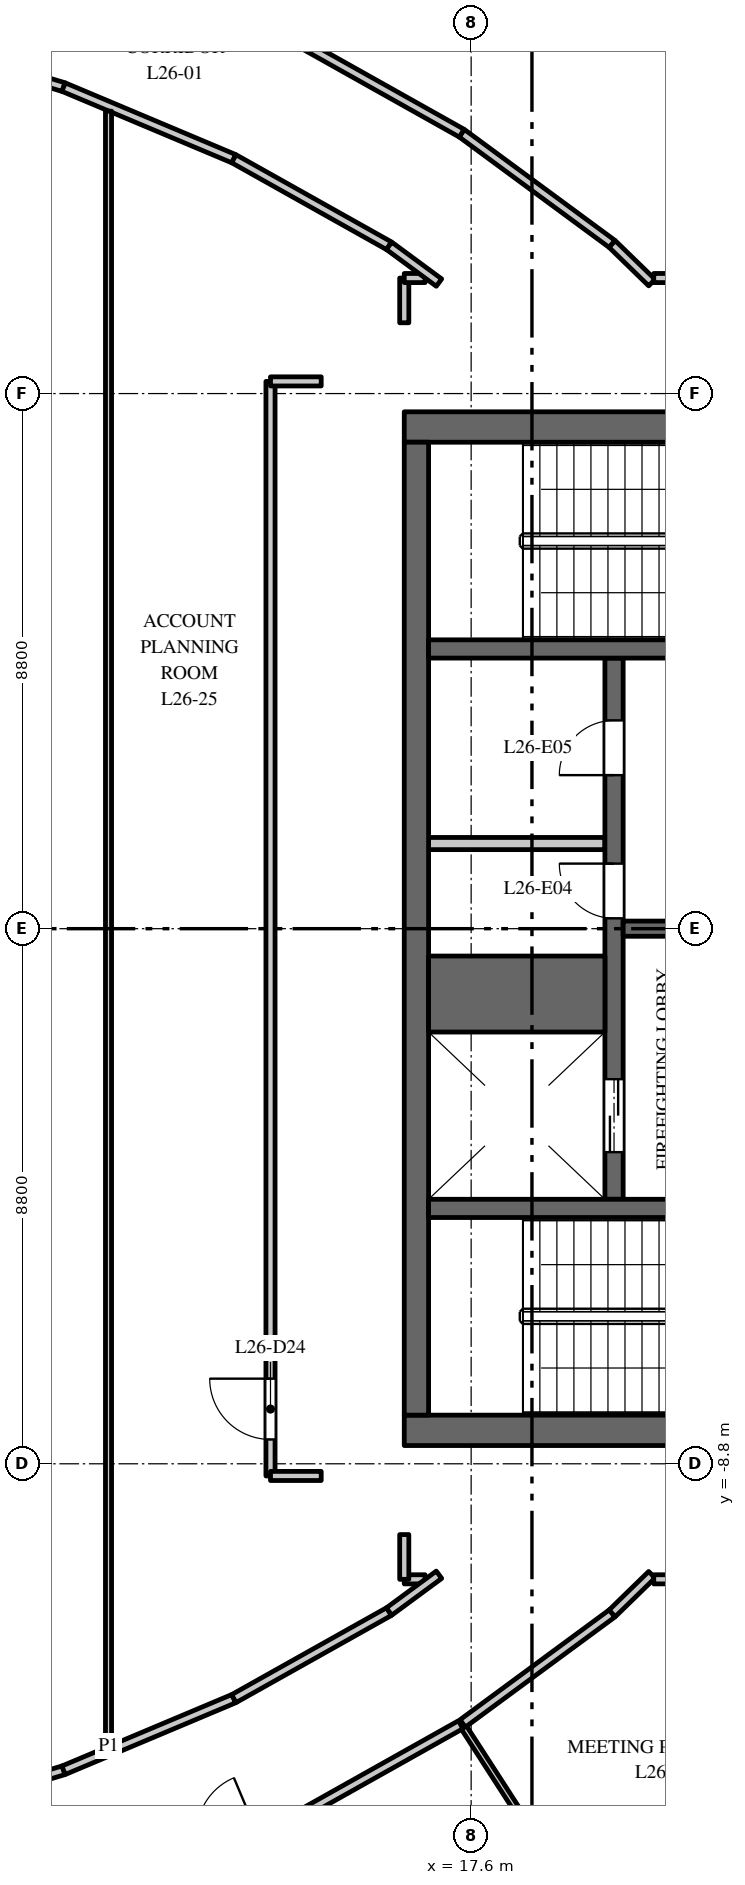
"""IFC4 building model, lengths in metres.
Left out: names, types, materials, properties, quantities, classifications, styles, units other than length and angle.
Written with IfcOpenShell. Run it as: python <this file> out.ifc"""

import sys

from ifc_helpers import new_model, si_unit, direction, frame, frame_2d, origin, place, context, subcontext, project, spatial, rectangle, extrude, element, fill, save


model = new_model("IFC4")
c1 = context("Model", 3, precision=1e-05, world=origin(), true_north=direction((0.0, 1.0)))
c2 = subcontext(c1, "Body", "Model", "MODEL_VIEW")
j1 = project(units=[si_unit("LENGTHUNIT", "METRE"), si_unit("PLANEANGLEUNIT", "RADIAN")], contexts=[c1])
p1 = place(None, origin())
s1 = spatial("IfcSite", under=j1, at=p1, CompositionType="ELEMENT")
p2 = place(p1, origin())
s2 = spatial("IfcBuilding", under=s1, at=p2, CompositionType="ELEMENT")
p3 = place(p2, frame((0.0, 0.0, 116.0)))
s3 = spatial("IfcBuildingStorey", under=s2, at=p3, CompositionType="ELEMENT", Elevation=116.0)
p4 = place(p3, frame((16.5, 8.25, 0.0), z_axis=(0.0, 0.0, 1.0), x_axis=(1.0, 0.0, 0.0)))
e1 = element("IfcWall", 1, at=p4, inside=s3, PredefinedType="SHEAR", context=c2, shape_type="SweptSolid", body=[
    extrude(rectangle(XDim=15.0, YDim=0.5, at=frame_2d((7.5, 0.0))), origin(), (0.0, 0.0, 1.0), 3.7),
])
p5 = place(p4, frame((6.9, 0.0, 0.0)))
e2 = element("IfcOpeningElement", 2, at=p5, cuts=e1, PredefinedType="OPENING", context=c2, shape_type="SweptSolid", body=[
    extrude(rectangle(XDim=1.2, YDim=2.1, at=frame_2d((0.6, 1.05))), frame((0.0, 0.26, 0.0), z_axis=(0.0, -1.0, 0.0), x_axis=(1.0, 0.0, 0.0)), (0.0, 0.0, 1.0), 0.52),
])
p6 = place(p4, frame((12.275, 0.0, 0.0)))
e3 = element("IfcOpeningElement", 3, at=p6, cuts=e1, PredefinedType="OPENING", context=c2, shape_type="SweptSolid", body=[
    extrude(rectangle(XDim=0.9, YDim=2.1, at=frame_2d((0.45, 1.05))), frame((0.0, 0.26, 0.0), z_axis=(0.0, -1.0, 0.0), x_axis=(1.0, 0.0, 0.0)), (0.0, 0.0, 1.0), 0.52),
])
p7 = place(p3, frame((16.5, -8.25, 0.0), z_axis=(0.0, 0.0, 1.0), x_axis=(1.0, 0.0, 0.0)))
e4 = element("IfcWall", 4, at=p7, inside=s3, PredefinedType="SHEAR", context=c2, shape_type="SweptSolid", body=[
    extrude(rectangle(XDim=15.0, YDim=0.5, at=frame_2d((7.5, 0.0))), origin(), (0.0, 0.0, 1.0), 3.7),
])
p8 = place(p7, frame((6.9, 0.0, 0.0)))
e5 = element("IfcOpeningElement", 5, at=p8, cuts=e4, PredefinedType="OPENING", context=c2, shape_type="SweptSolid", body=[
    extrude(rectangle(XDim=1.2, YDim=2.1, at=frame_2d((0.6, 1.05))), frame((0.0, 0.26, 0.0), z_axis=(0.0, -1.0, 0.0), x_axis=(1.0, 0.0, 0.0)), (0.0, 0.0, 1.0), 0.52),
])
p9 = place(p7, frame((12.95, 0.0, 0.0)))
e6 = element("IfcOpeningElement", 6, at=p9, cuts=e4, PredefinedType="OPENING", context=c2, shape_type="SweptSolid", body=[
    extrude(rectangle(XDim=0.9, YDim=2.1, at=frame_2d((0.45, 1.05))), frame((0.0, 0.26, 0.0), z_axis=(0.0, -1.0, 0.0), x_axis=(1.0, 0.0, 0.0)), (0.0, 0.0, 1.0), 0.52),
])
p10 = place(p3, frame((16.9, 1.4, 0.0), z_axis=(0.0, 0.0, 1.0), x_axis=(1.0, 0.0, 0.0)))
e7 = element("IfcWall", 7, at=p10, inside=s3, PredefinedType="PARTITIONING", context=c2, shape_type="SweptSolid", body=[
    extrude(rectangle(XDim=2.9, YDim=0.2, at=frame_2d((1.45, 0.0))), origin(), (0.0, 0.0, 1.0), 3.7),
])
p11 = place(p3, frame((19.95, -4.45, 0.0), z_axis=(0.0, 0.0, 1.0), x_axis=(0.0, 1.0, 0.0)))
e8 = element("IfcWall", 8, at=p11, inside=s3, PredefinedType="SHEAR", context=c2, shape_type="SweptSolid", body=[
    extrude(rectangle(XDim=8.9, YDim=0.3, at=frame_2d((4.45, 0.0))), origin(), (0.0, 0.0, 1.0), 3.7),
])
p12 = place(p11, frame((0.775, 0.0, 0.0)))
e9 = element("IfcOpeningElement", 9, at=p12, cuts=e8, PredefinedType="OPENING", context=c2, shape_type="SweptSolid", body=[
    extrude(rectangle(XDim=1.2, YDim=2.1, at=frame_2d((0.6, 1.05))), frame((0.0, 0.16, 0.0), z_axis=(0.0, -1.0, 0.0), x_axis=(1.0, 0.0, 0.0)), (0.0, 0.0, 1.0), 0.32),
])
p13 = place(p11, frame((4.62, 0.0, 0.0)))
e10 = element("IfcOpeningElement", 10, at=p13, cuts=e8, PredefinedType="OPENING", context=c2, shape_type="SweptSolid", body=[
    extrude(rectangle(XDim=0.9, YDim=2.1, at=frame_2d((0.45, 1.05))), frame((0.0, 0.16, 0.0), z_axis=(0.0, -1.0, 0.0), x_axis=(1.0, 0.0, 0.0)), (0.0, 0.0, 1.0), 0.32),
])
p14 = place(p11, frame((6.975, 0.0, 0.0)))
e11 = element("IfcOpeningElement", 11, at=p14, cuts=e8, PredefinedType="OPENING", context=c2, shape_type="SweptSolid", body=[
    extrude(rectangle(XDim=0.9, YDim=2.1, at=frame_2d((0.45, 1.05))), frame((0.0, 0.16, 0.0), z_axis=(0.0, -1.0, 0.0), x_axis=(1.0, 0.0, 0.0)), (0.0, 0.0, 1.0), 0.32),
])
p15 = place(p3, frame((20.1, 0.0, 0.0), z_axis=(0.0, 0.0, 1.0), x_axis=(1.0, 0.0, 0.0)))
e12 = element("IfcWall", 12, at=p15, inside=s3, PredefinedType="SHEAR", context=c2, shape_type="SweptSolid", body=[
    extrude(rectangle(XDim=3.28, YDim=0.25, at=frame_2d((1.64, 0.0))), origin(), (0.0, 0.0, 1.0), 3.7),
])
p16 = place(p3, frame((16.7, -8.0, 0.0), z_axis=(0.0, 0.0, 1.0), x_axis=(0.0, 1.0, 0.0)))
e13 = element("IfcWall", 13, at=p16, inside=s3, PredefinedType="SHEAR", context=c2, shape_type="SweptSolid", body=[
    extrude(rectangle(XDim=16.0, YDim=0.4, at=frame_2d((8.0, 0.0))), origin(), (0.0, 0.0, 1.0), 3.7),
])
p17 = place(p3, frame((16.9, -1.075, 0.0), z_axis=(0.0, 0.0, 1.0), x_axis=(1.0, 0.0, 0.0)))
e14 = element("IfcWall", 14, at=p17, inside=s3, PredefinedType="SHEAR", context=c2, shape_type="SweptSolid", body=[
    extrude(rectangle(XDim=2.9, YDim=1.25, at=frame_2d((1.45, 0.0))), origin(), (0.0, 0.0, 1.0), 3.7),
])
p18 = place(p3, frame((16.9, 4.6, 0.0), z_axis=(0.0, 0.0, 1.0), x_axis=(1.0, 0.0, 0.0)))
e15 = element("IfcWall", 15, at=p18, inside=s3, PredefinedType="SHEAR", context=c2, shape_type="SweptSolid", body=[
    extrude(rectangle(XDim=6.18, YDim=0.3, at=frame_2d((3.09, 0.0))), origin(), (0.0, 0.0, 1.0), 3.7),
])
p19 = place(p18, frame((4.9, 0.0, 0.0)))
e16 = element("IfcOpeningElement", 16, at=p19, cuts=e15, PredefinedType="OPENING", context=c2, shape_type="SweptSolid", body=[
    extrude(rectangle(XDim=1.1, YDim=2.1, at=frame_2d((0.55, 1.05))), frame((0.0, 0.16, 0.0), z_axis=(0.0, -1.0, 0.0), x_axis=(1.0, 0.0, 0.0)), (0.0, 0.0, 1.0), 0.32),
])
p20 = place(p3, frame((16.9, -4.6, 0.0), z_axis=(0.0, 0.0, 1.0), x_axis=(1.0, 0.0, 0.0)))
e17 = element("IfcWall", 17, at=p20, inside=s3, PredefinedType="SHEAR", context=c2, shape_type="SweptSolid", body=[
    extrude(rectangle(XDim=6.18, YDim=0.3, at=frame_2d((3.09, 0.0))), origin(), (0.0, 0.0, 1.0), 3.7),
])
p21 = place(p20, frame((4.9, 0.0, 0.0)))
e18 = element("IfcOpeningElement", 18, at=p21, cuts=e17, PredefinedType="OPENING", context=c2, shape_type="SweptSolid", body=[
    extrude(rectangle(XDim=1.1, YDim=2.1, at=frame_2d((0.55, 1.05))), frame((0.0, 0.16, 0.0), z_axis=(0.0, -1.0, 0.0), x_axis=(1.0, 0.0, 0.0)), (0.0, 0.0, 1.0), 0.32),
])
p22 = place(p3, frame((7.912, -14.738, 0.0), z_axis=(0.0, 0.0, 1.0), x_axis=(0.957606118849, 0.28808075455, 0.0)))
e19 = element("IfcWall", 19, at=p22, inside=s3, PredefinedType="PARTITIONING", context=c2, shape_type="SweptSolid", body=[
    extrude(rectangle(XDim=3.117, YDim=0.15, at=frame_2d((1.559, 0.0))), origin(), (0.0, 0.0, 1.0), 2.85),
])
p23 = place(p3, frame((7.912, 14.738, 0.0), z_axis=(0.0, 0.0, 1.0), x_axis=(0.957606118849, -0.28808075455, 0.0)))
e20 = element("IfcWall", 20, at=p23, inside=s3, PredefinedType="PARTITIONING", context=c2, shape_type="SweptSolid", body=[
    extrude(rectangle(XDim=3.117, YDim=0.15, at=frame_2d((1.559, 0.0))), origin(), (0.0, 0.0, 1.0), 2.85),
])
p24 = place(p23, frame((0.65, 0.0, 0.0)))
e21 = element("IfcOpeningElement", 21, at=p24, cuts=e20, PredefinedType="OPENING", context=c2, shape_type="SweptSolid", body=[
    extrude(rectangle(XDim=1.0, YDim=2.1, at=frame_2d((0.5, 1.05))), frame((0.0, 0.085, 0.0), z_axis=(0.0, -1.0, 0.0), x_axis=(1.0, 0.0, 0.0)), (0.0, 0.0, 1.0), 0.17),
])
for number, where, z_axis, x_axis in (
    (22, (10.897, -13.84, 0.0), (0.0, 0.0, 1.0), (0.922, 0.388, 0.0)),
    (23, (10.897, 13.84, 0.0), (0.0, 0.0, 1.0), (0.922, -0.388, 0.0)),
):
    element("IfcWall", number, at=place(p3, frame(where, z_axis=z_axis, x_axis=x_axis)), inside=s3, PredefinedType="PARTITIONING", context=c2, shape_type="SweptSolid", body=[
        extrude(rectangle(XDim=3.038, YDim=0.15, at=frame_2d((1.519, 0.0))), origin(), (0.0, 0.0, 1.0), 3.7),
    ])
p25 = place(p3, frame((11.636, -13.444, 0.0), z_axis=(0.0, 0.0, 1.0), x_axis=(0.0, 1.0, 0.0)))
e24 = element("IfcWall", 24, at=p25, inside=s3, PredefinedType="PARTITIONING", context=c2, shape_type="SweptSolid", body=[
    extrude(rectangle(XDim=26.888, YDim=0.1, at=frame_2d((13.444, 0.0))), origin(), (0.0, 0.0, 1.0), 2.75),
])
for number, where, z_axis, x_axis in (
    (25, (13.697, -12.662, 0.0), (0.0, 0.0, 1.0), (0.872, 0.489, 0.0)),
    (26, (13.697, 12.662, 0.0), (0.0, 0.0, 1.0), (0.872, -0.489, 0.0)),
):
    element("IfcWall", number, at=place(p3, frame(where, z_axis=z_axis, x_axis=x_axis)), inside=s3, PredefinedType="PARTITIONING", context=c2, shape_type="SweptSolid", body=[
        extrude(rectangle(XDim=2.927, YDim=0.15, at=frame_2d((1.464, 0.0))), origin(), (0.0, 0.0, 1.0), 3.7),
    ])
p26 = place(p3, frame((14.3, -9.0, 0.0), z_axis=(0.0, 0.0, 1.0), x_axis=(0.0, 1.0, 0.0)))
e27 = element("IfcWall", 27, at=p26, inside=s3, PredefinedType="PARTITIONING", context=c2, shape_type="SweptSolid", body=[
    extrude(rectangle(XDim=18.0, YDim=0.15, at=frame_2d((9.0, 0.0))), origin(), (0.0, 0.0, 1.0), 2.75),
])
p27 = place(p26, frame((0.6, 0.0, 0.0)))
e28 = element("IfcOpeningElement", 28, at=p27, cuts=e27, PredefinedType="OPENING", context=c2, shape_type="SweptSolid", body=[
    extrude(rectangle(XDim=1.0, YDim=2.1, at=frame_2d((0.5, 1.05))), frame((0.0, 0.085, 0.0), z_axis=(0.0, -1.0, 0.0), x_axis=(1.0, 0.0, 0.0)), (0.0, 0.0, 1.0), 0.17),
])
for number, where, z_axis, x_axis in (
    (29, (14.3, -9.0, 0.0), (0.0, 0.0, 1.0), (1.0, 0.0, 0.0)),
    (30, (14.3, 9.0, 0.0), (0.0, 0.0, 1.0), (1.0, 0.0, 0.0)),
):
    element("IfcWall", number, at=place(p3, frame(where, z_axis=z_axis, x_axis=x_axis)), inside=s3, PredefinedType="PARTITIONING", context=c2, shape_type="SweptSolid", body=[
        extrude(rectangle(XDim=0.834, YDim=0.15, at=frame_2d((0.417, 0.0))), origin(), (0.0, 0.0, 1.0), 3.7),
    ])
p28 = place(p3, frame((14.665, -14.642, 0.0), z_axis=(0.0, 0.0, 1.0), x_axis=(0.871997056828, 0.4895111162, 0.0)))
e31 = element("IfcWall", 31, at=p28, inside=s3, PredefinedType="PARTITIONING", context=c2, shape_type="SweptSolid", body=[
    extrude(rectangle(XDim=3.168, YDim=0.15, at=frame_2d((1.584, 0.0))), origin(), (0.0, 0.0, 1.0), 3.7),
])
p29 = place(p3, frame((14.665, 14.642, 0.0), z_axis=(0.0, 0.0, 1.0), x_axis=(0.872072095629, -0.489377420837, 0.0)))
e32 = element("IfcWall", 32, at=p29, inside=s3, PredefinedType="PARTITIONING", context=c2, shape_type="SweptSolid", body=[
    extrude(rectangle(XDim=3.188, YDim=0.15, at=frame_2d((1.594, 0.0))), origin(), (0.0, 0.0, 1.0), 3.7),
])
for number, where, z_axis, x_axis in (
    (33, (16.25, -11.23, 0.0), (0.0, 0.0, 1.0), (0.805, 0.593, 0.0)),
    (34, (16.25, 11.23, 0.0), (0.0, 0.0, 1.0), (0.805, -0.593, 0.0)),
):
    element("IfcWall", number, at=place(p3, frame(where, z_axis=z_axis, x_axis=x_axis)), inside=s3, PredefinedType="PARTITIONING", context=c2, shape_type="SweptSolid", body=[
        extrude(rectangle(XDim=1.02, YDim=0.15, at=frame_2d((0.51, 0.0))), origin(), (0.0, 0.0, 1.0), 3.7),
    ])
p30 = place(p3, frame((16.5, -10.7, 0.0), z_axis=(0.0, 0.0, 1.0), x_axis=(0.0, 1.0, 0.0)))
e35 = element("IfcWall", 35, at=p30, inside=s3, PredefinedType="PARTITIONING", context=c2, shape_type="SweptSolid", body=[
    extrude(rectangle(XDim=0.736, YDim=0.15, at=frame_2d((0.368, 0.0))), origin(), (0.0, 0.0, 1.0), 3.7),
])
p31 = place(p3, frame((16.5, -10.7, 0.0), z_axis=(0.0, 0.0, 1.0), x_axis=(1.0, 0.0, 0.0)))
e36 = element("IfcWall", 36, at=p31, inside=s3, PredefinedType="PARTITIONING", context=c2, shape_type="SweptSolid", body=[
    extrude(rectangle(XDim=0.343, YDim=0.15, at=frame_2d((0.171, 0.0))), origin(), (0.0, 0.0, 1.0), 3.7),
])
p32 = place(p3, frame((16.5, 9.964, 0.0), z_axis=(0.0, 0.0, 1.0), x_axis=(0.0, 1.0, 0.0)))
e37 = element("IfcWall", 37, at=p32, inside=s3, PredefinedType="PARTITIONING", context=c2, shape_type="SweptSolid", body=[
    extrude(rectangle(XDim=0.736, YDim=0.15, at=frame_2d((0.368, 0.0))), origin(), (0.0, 0.0, 1.0), 3.7),
])
p33 = place(p3, frame((16.5, 10.7, 0.0), z_axis=(0.0, 0.0, 1.0), x_axis=(1.0, 0.0, 0.0)))
e38 = element("IfcWall", 38, at=p33, inside=s3, PredefinedType="PARTITIONING", context=c2, shape_type="SweptSolid", body=[
    extrude(rectangle(XDim=0.343, YDim=0.15, at=frame_2d((0.171, 0.0))), origin(), (0.0, 0.0, 1.0), 3.7),
])
p34 = place(p3, frame((17.445, 13.082, 0.0), z_axis=(0.0, 0.0, 1.0), x_axis=(0.805185638843, -0.593022838516, 0.0)))
e39 = element("IfcWall", 39, at=p34, inside=s3, PredefinedType="PARTITIONING", context=c2, shape_type="SweptSolid", body=[
    extrude(rectangle(XDim=3.073, YDim=0.15, at=frame_2d((1.536, 0.0))), origin(), (0.0, 0.0, 1.0), 3.7),
])
p35 = place(p3, frame((17.447, -13.085, 0.0), z_axis=(0.0, 0.0, 1.0), x_axis=(0.542325736183, -0.840168314015, 0.0)))
e40 = element("IfcWall", 40, at=p35, inside=s3, PredefinedType="PARTITIONING", context=c2, shape_type="SweptSolid", body=[
    extrude(rectangle(XDim=10.066, YDim=0.1, at=frame_2d((5.033, 0.0))), origin(), (0.0, 0.0, 1.0), 3.7),
])
p36 = place(p3, frame((17.461, -13.07, 0.0), z_axis=(0.0, 0.0, 1.0), x_axis=(0.805228684186, 0.592964388613, 0.0)))
e41 = element("IfcWall", 41, at=p36, inside=s3, PredefinedType="PARTITIONING", context=c2, shape_type="SweptSolid", body=[
    extrude(rectangle(XDim=3.052, YDim=0.15, at=frame_2d((1.526, 0.0))), origin(), (0.0, 0.0, 1.0), 3.7),
])
for number, where, z_axis, x_axis in (
    (42, (19.919, -11.26, 0.0), (0.0, 0.0, 1.0), (0.717, 0.697, 0.0)),
    (43, (19.919, 11.26, 0.0), (0.0, 0.0, 1.0), (0.717, -0.697, 0.0)),
):
    element("IfcWall", number, at=place(p3, frame(where, z_axis=z_axis, x_axis=x_axis)), inside=s3, PredefinedType="PARTITIONING", context=c2, shape_type="SweptSolid", body=[
        extrude(rectangle(XDim=0.911, YDim=0.15, at=frame_2d((0.456, 0.0))), origin(), (0.0, 0.0, 1.0), 2.75),
    ])
p37 = place(p3, frame((20.603, -10.7, 0.0), z_axis=(0.0, 0.0, 1.0), x_axis=(1.0, 0.0, 0.0)))
e44 = element("IfcWall", 44, at=p37, inside=s3, PredefinedType="PARTITIONING", context=c2, shape_type="SweptSolid", body=[
    extrude(rectangle(XDim=10.897, YDim=0.15, at=frame_2d((5.448, 0.0))), origin(), (0.0, 0.0, 1.0), 2.9),
])
p38 = place(p37, frame((0.542, 0.0, 0.0)))
e45 = element("IfcOpeningElement", 45, at=p38, cuts=e44, PredefinedType="OPENING", context=c2, shape_type="SweptSolid", body=[
    extrude(rectangle(XDim=1.0, YDim=2.1, at=frame_2d((0.5, 1.05))), frame((0.0, 0.085, 0.0), z_axis=(0.0, -1.0, 0.0), x_axis=(1.0, 0.0, 0.0)), (0.0, 0.0, 1.0), 0.17),
])
p39 = place(p37, frame((7.372, 0.0, 0.0)))
e46 = element("IfcOpeningElement", 46, at=p39, cuts=e44, PredefinedType="OPENING", context=c2, shape_type="SweptSolid", body=[
    extrude(rectangle(XDim=1.0, YDim=2.1, at=frame_2d((0.5, 1.05))), frame((0.0, 0.085, 0.0), z_axis=(0.0, -1.0, 0.0), x_axis=(1.0, 0.0, 0.0)), (0.0, 0.0, 1.0), 0.17),
])
p40 = place(p3, frame((20.603, 10.7, 0.0), z_axis=(0.0, 0.0, 1.0), x_axis=(1.0, 0.0, 0.0)))
e47 = element("IfcWall", 47, at=p40, inside=s3, PredefinedType="PARTITIONING", context=c2, shape_type="SweptSolid", body=[
    extrude(rectangle(XDim=3.207, YDim=0.15, at=frame_2d((1.604, 0.0))), origin(), (0.0, 0.0, 1.0), 3.7),
])
p41 = place(p12, origin())
e48 = element("IfcDoor", 48, at=p41, inside=s3, OperationType="DOUBLE_DOOR_SLIDING", PredefinedType="DOOR", context=c2, shape_type="SweptSolid", body=[
    extrude(rectangle(XDim=1.2, YDim=2.1, at=frame_2d((0.6, 1.05))), frame((0.0, 0.025, 0.0), z_axis=(0.0, -1.0, 0.0), x_axis=(1.0, 0.0, 0.0)), (0.0, 0.0, 1.0), 0.05),
])
fill(e9, e48)
p42 = place(p13, origin())
e49 = element("IfcDoor", 49, at=p42, inside=s3, OperationType="SINGLE_SWING_LEFT", PredefinedType="DOOR", context=c2, shape_type="SweptSolid", body=[
    extrude(rectangle(XDim=0.9, YDim=2.1, at=frame_2d((0.45, 1.05))), frame((0.0, 0.025, 0.0), z_axis=(0.0, -1.0, 0.0), x_axis=(1.0, 0.0, 0.0)), (0.0, 0.0, 1.0), 0.05),
])
fill(e10, e49)
p43 = place(p14, origin())
e50 = element("IfcDoor", 50, at=p43, inside=s3, OperationType="SINGLE_SWING_RIGHT", PredefinedType="DOOR", context=c2, shape_type="SweptSolid", body=[
    extrude(rectangle(XDim=0.9, YDim=2.1, at=frame_2d((0.45, 1.05))), frame((0.0, 0.025, 0.0), z_axis=(0.0, -1.0, 0.0), x_axis=(1.0, 0.0, 0.0)), (0.0, 0.0, 1.0), 0.05),
])
fill(e11, e50)
p44 = place(p27, origin())
e51 = element("IfcDoor", 51, at=p44, inside=s3, OperationType="SINGLE_SWING_RIGHT", PredefinedType="DOOR", context=c2, shape_type="SweptSolid", body=[
    extrude(rectangle(XDim=1.0, YDim=2.1, at=frame_2d((0.5, 1.05))), frame((0.0, 0.025, 0.0), z_axis=(0.0, -1.0, 0.0), x_axis=(1.0, 0.0, 0.0)), (0.0, 0.0, 1.0), 0.05),
])
fill(e28, e51)
save(model, sys.argv[1])
